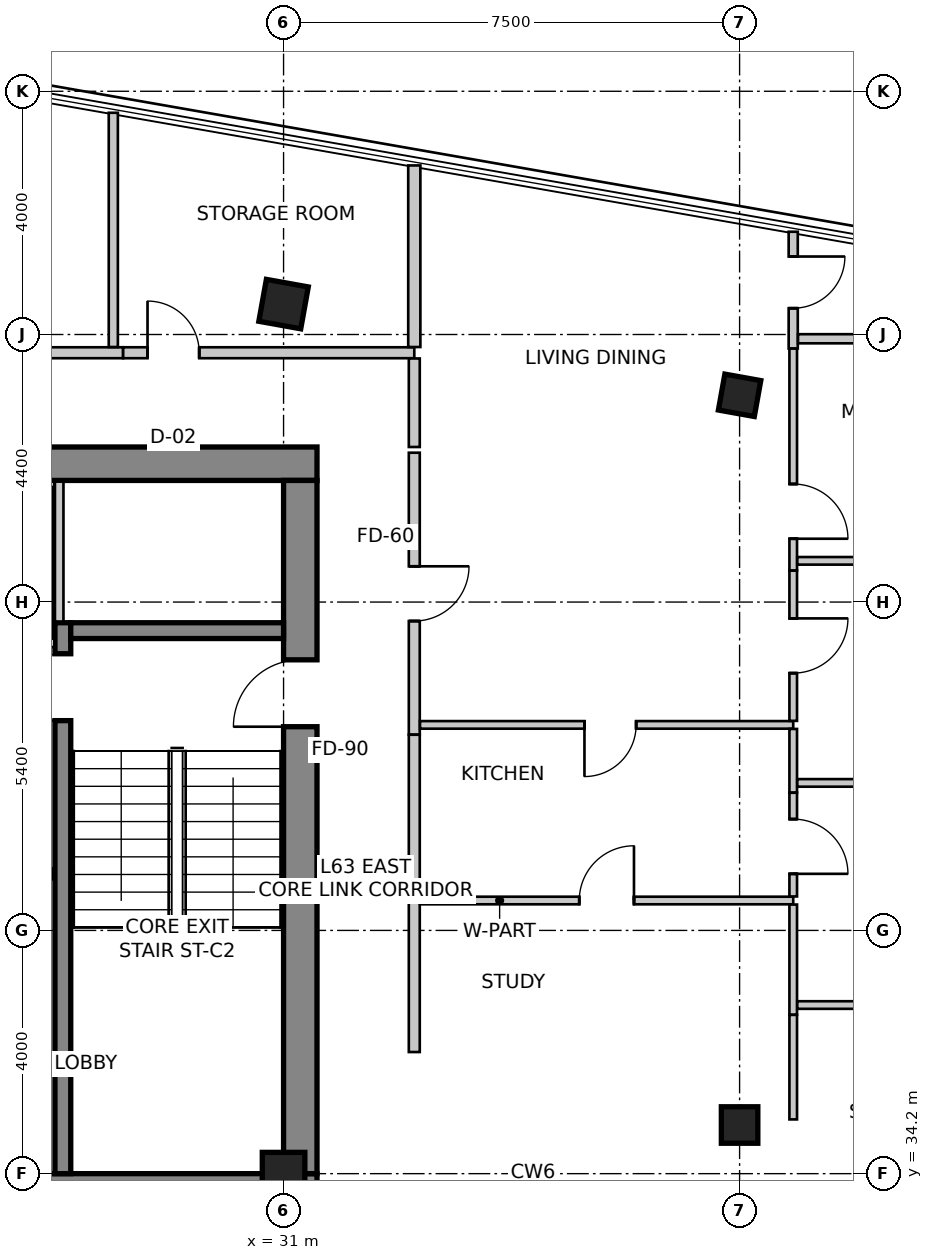
"""IFC4 building model, lengths in metres.
Left out: names, types, materials, properties, quantities, classifications, styles, units other than length and angle.
Written with IfcOpenShell. Run it as: python <this file> out.ifc"""

import sys

from ifc_helpers import new_model, si_unit, direction, frame, frame_2d, origin, origin_2d, place, context, subcontext, project, spatial, rectangle, extrude, source, transform, mapped, element, fill, save


model = new_model("IFC4")
c1 = context("Model", 3, precision=1e-05, world=origin(), true_north=direction((0.0, 1.0)))
c2 = subcontext(c1, "Body", "Model", "MODEL_VIEW")
j1 = project(units=[si_unit("LENGTHUNIT", "METRE"), si_unit("PLANEANGLEUNIT", "RADIAN")], contexts=[c1])
p1 = place(None, origin())
s1 = spatial("IfcSite", under=j1, at=p1, CompositionType="ELEMENT")
p2 = place(p1, origin())
s2 = spatial("IfcBuilding", under=s1, at=p2, CompositionType="ELEMENT")
p3 = place(p2, frame((0.0, 0.0, 249.3)))
s3 = spatial("IfcBuildingStorey", under=s2, at=p3, CompositionType="ELEMENT", Elevation=249.3)
p4 = place(p3, frame((16.05, 45.875, 0.0), z_axis=(0.0, 0.0, 1.0), x_axis=(1.0, 0.0, 0.0)))
e1 = element("IfcWall", 1, at=p4, inside=s3, PredefinedType="SHEAR", context=c2, shape_type="SweptSolid", body=[
    extrude(rectangle(XDim=15.5, YDim=0.55, at=frame_2d((7.75, 0.0))), origin(), (0.0, 0.0, 1.0), 3.6),
])
p5 = place(p3, frame((16.05, 33.925, 0.0), z_axis=(0.0, 0.0, 1.0), x_axis=(1.0, 0.0, 0.0)))
e2 = element("IfcWall", 2, at=p5, inside=s3, PredefinedType="SHEAR", context=c2, shape_type="SweptSolid", body=[
    extrude(rectangle(XDim=15.5, YDim=0.55, at=frame_2d((7.75, 0.0))), origin(), (0.0, 0.0, 1.0), 3.6),
])
m1 = source(origin(), c2, "Body", "SweptSolid", [
    extrude(rectangle(XDim=1.1, YDim=2.15, at=frame_2d((0.55, 1.075))), frame((0.0, 0.285, 0.0), z_axis=(0.0, -1.0, 0.0), x_axis=(1.0, 0.0, 0.0)), (0.0, 0.0, 1.0), 0.57),
])
p6 = place(p5, frame((9.98, 0.0, 0.0)))
e3 = element("IfcOpeningElement", 3, at=p6, cuts=e2, PredefinedType="OPENING", context=c2, shape_type="MappedRepresentation", body=[
    mapped(m1, transform((0.0, 0.0, 0.0), scale=1.0)),
])
p7 = place(p3, frame((31.275, 34.2, 0.0), z_axis=(0.0, 0.0, 1.0), x_axis=(0.0, 1.0, 0.0)))
e4 = element("IfcWall", 4, at=p7, inside=s3, PredefinedType="SHEAR", context=c2, shape_type="SweptSolid", body=[
    extrude(rectangle(XDim=11.4, YDim=0.55, at=frame_2d((5.7, 0.0))), origin(), (0.0, 0.0, 1.0), 3.6),
])
p8 = place(p7, frame((7.35, 0.0, 0.0)))
e5 = element("IfcOpeningElement", 5, at=p8, cuts=e4, PredefinedType="OPENING", context=c2, shape_type="MappedRepresentation", body=[
    mapped(m1, transform((0.0, 0.0, 0.0), scale=1.0)),
])
p9 = place(p3, frame((27.37, 34.2, 0.0), z_axis=(0.0, 0.0, 1.0), x_axis=(0.0, 1.0, 0.0)))
e6 = element("IfcWall", 6, at=p9, inside=s3, PredefinedType="SHEAR", context=c2, shape_type="SweptSolid", body=[
    extrude(rectangle(XDim=9.06, YDim=0.26, at=frame_2d((4.53, 0.0))), origin(), (0.0, 0.0, 1.0), 3.6),
])
m2 = source(origin(), c2, "Body", "SweptSolid", [
    extrude(rectangle(XDim=1.1, YDim=2.15, at=frame_2d((0.55, 1.075))), frame((0.0, 0.14, 0.0), z_axis=(0.0, -1.0, 0.0), x_axis=(1.0, 0.0, 0.0)), (0.0, 0.0, 1.0), 0.28),
])
p10 = place(p9, frame((7.45, 0.0, 0.0)))
e7 = element("IfcOpeningElement", 7, at=p10, cuts=e6, PredefinedType="OPENING", context=c2, shape_type="MappedRepresentation", body=[
    mapped(m2, transform((0.0, 0.0, 0.0), scale=1.0)),
])
p11 = place(p3, frame((27.5, 43.13, 0.0), z_axis=(0.0, 0.0, 1.0), x_axis=(1.0, 0.0, 0.0)))
e8 = element("IfcWall", 8, at=p11, inside=s3, PredefinedType="SHEAR", context=c2, shape_type="SweptSolid", body=[
    extrude(rectangle(XDim=3.5, YDim=0.26, at=frame_2d((1.75, 0.0))), origin(), (0.0, 0.0, 1.0), 3.6),
])
m3 = source(origin(), c2, "Body", "SweptSolid", [
    extrude(rectangle(XDim=0.7, YDim=0.7, at=origin_2d()), origin(), (0.0, 0.0, 1.0), 3.6),
])
p12 = place(p3, frame((31.0, 48.5, 0.0), z_axis=(0.0, 0.0, 1.0), x_axis=(0.984195607969, -0.17708474032, 0.0)))
e9 = element("IfcColumn", 9, at=p12, inside=s3, PredefinedType="COLUMN", context=c2, shape_type="MappedRepresentation", body=[
    mapped(m3, transform((0.0, 0.0, 0.0), scale=1.0)),
])
m4 = source(origin(), c2, "Body", "SweptSolid", [
    extrude(rectangle(XDim=0.6, YDim=0.6, at=origin_2d()), origin(), (0.0, 0.0, 1.0), 3.6),
])
p13 = place(p3, frame((38.5, 47.0, 0.0), z_axis=(0.0, 0.0, 1.0), x_axis=(0.984195607969, -0.17708474032, 0.0)))
e10 = element("IfcColumn", 10, at=p13, inside=s3, PredefinedType="COLUMN", context=c2, shape_type="MappedRepresentation", body=[
    mapped(m4, transform((0.0, 0.0, 0.0), scale=1.0)),
])
p14 = place(p3, frame((31.0, 34.2, 0.0), z_axis=(0.0, 0.0, 1.0), x_axis=(1.0, 0.0, 0.0)))
e11 = element("IfcColumn", 11, at=p14, inside=s3, PredefinedType="COLUMN", context=c2, shape_type="MappedRepresentation", body=[
    mapped(m3, transform((0.0, 0.0, 0.0), scale=1.0)),
])
p15 = place(p3, frame((38.5, 35.0, 0.0), z_axis=(0.0, 0.0, 1.0), x_axis=(1.0, 0.0, 0.0)))
e12 = element("IfcColumn", 12, at=p15, inside=s3, PredefinedType="COLUMN", context=c2, shape_type="MappedRepresentation", body=[
    mapped(m4, transform((0.0, 0.0, 0.0), scale=1.0)),
])
p16 = place(p3, frame((20.37, 42.93, 0.0), z_axis=(0.0, 0.0, 1.0), x_axis=(1.0, 0.0, 0.0)))
e13 = element("IfcWall", 13, at=p16, inside=s3, PredefinedType="SOLIDWALL", context=c2, shape_type="SweptSolid", body=[
    extrude(rectangle(XDim=6.86, YDim=0.14, at=frame_2d((3.43, 0.0))), origin(), (0.0, 0.0, 1.0), 3.35),
])
m5 = source(origin(), c2, "Body", "SweptSolid", [
    extrude(rectangle(XDim=1.1, YDim=2.15, at=frame_2d((0.55, 1.075))), frame((0.0, 0.08, 0.0), z_axis=(0.0, -1.0, 0.0), x_axis=(1.0, 0.0, 0.0)), (0.0, 0.0, 1.0), 0.16),
])
p17 = place(p16, frame((0.5, 0.0, 0.0)))
e14 = element("IfcOpeningElement", 14, at=p17, cuts=e13, PredefinedType="OPENING", context=c2, shape_type="MappedRepresentation", body=[
    mapped(m5, transform((0.0, 0.0, 0.0), scale=1.0)),
])
p18 = place(p16, frame((2.7, 0.0, 0.0)))
e15 = element("IfcOpeningElement", 15, at=p18, cuts=e13, PredefinedType="OPENING", context=c2, shape_type="MappedRepresentation", body=[
    mapped(m5, transform((0.0, 0.0, 0.0), scale=1.0)),
])
p19 = place(p16, frame((5.1, 0.0, 0.0)))
e16 = element("IfcOpeningElement", 16, at=p19, cuts=e13, PredefinedType="OPENING", context=c2, shape_type="MappedRepresentation", body=[
    mapped(m5, transform((0.0, 0.0, 0.0), scale=1.0)),
])
p20 = place(p3, frame((27.31, 43.28, 0.0), z_axis=(0.0, 0.0, 1.0), x_axis=(0.0, 1.0, 0.0)))
e17 = element("IfcWall", 17, at=p20, inside=s3, PredefinedType="SOLIDWALL", context=c2, shape_type="SweptSolid", body=[
    extrude(rectangle(XDim=2.3, YDim=0.14, at=frame_2d((1.15, 0.0))), origin(), (0.0, 0.0, 1.0), 3.35),
])
p21 = place(p3, frame((24.162, 47.7, 0.0), z_axis=(0.0, 0.0, 1.0), x_axis=(1.0, 0.0, 0.0)))
e18 = element("IfcWall", 18, at=p21, inside=s3, PredefinedType="PARTITIONING", context=c2, shape_type="SweptSolid", body=[
    extrude(rectangle(XDim=4.198, YDim=0.18, at=frame_2d((2.099, 0.0))), origin(), (0.0, 0.0, 1.0), 3.35),
])
m6 = source(origin(), c2, "Body", "SweptSolid", [
    extrude(rectangle(XDim=0.85, YDim=2.15, at=frame_2d((0.425, 1.075))), frame((0.0, 0.1, 0.0), z_axis=(0.0, -1.0, 0.0), x_axis=(1.0, 0.0, 0.0)), (0.0, 0.0, 1.0), 0.2),
])
p22 = place(p21, frame((1.613, 0.0, 0.0)))
e19 = element("IfcOpeningElement", 19, at=p22, cuts=e18, PredefinedType="OPENING", context=c2, shape_type="MappedRepresentation", body=[
    mapped(m6, transform((0.0, 0.0, 0.0), scale=1.0)),
])
p23 = place(p3, frame((28.362, 47.7, 0.0), z_axis=(0.0, 0.0, 1.0), x_axis=(1.0, 0.0, 0.0)))
e20 = element("IfcWall", 20, at=p23, inside=s3, PredefinedType="PARTITIONING", context=c2, shape_type="SweptSolid", body=[
    extrude(rectangle(XDim=4.788, YDim=0.18, at=frame_2d((2.394, 0.0))), origin(), (0.0, 0.0, 1.0), 2.788),
])
p24 = place(p23, frame((0.401, 0.0, 0.0)))
e21 = element("IfcOpeningElement", 21, at=p24, cuts=e20, PredefinedType="OPENING", context=c2, shape_type="MappedRepresentation", body=[
    mapped(m6, transform((0.0, 0.0, 0.0), scale=1.0)),
])
p25 = place(p3, frame((33.15, 47.606, 0.0), z_axis=(0.0, 0.0, 1.0), x_axis=(0.0, -1.0, 0.0)))
e22 = element("IfcWall", 22, at=p25, inside=s3, PredefinedType="PARTITIONING", context=c2, shape_type="SweptSolid", body=[
    extrude(rectangle(XDim=1.456, YDim=0.18, at=frame_2d((0.728, 0.0))), origin(), (0.0, 0.0, 1.0), 3.35),
])
p26 = place(p3, frame((33.15, 38.852, 0.0), z_axis=(0.0, 0.0, 1.0), x_axis=(0.0, -1.0, 0.0)))
e23 = element("IfcWall", 23, at=p26, inside=s3, PredefinedType="PARTITIONING", context=c2, shape_type="SweptSolid", body=[
    extrude(rectangle(XDim=2.652, YDim=0.18, at=frame_2d((1.326, 0.0))), origin(), (0.0, 0.0, 1.0), 3.35),
])
p27 = place(p3, frame((33.15, 46.056, 0.0), z_axis=(0.0, 0.0, 1.0), x_axis=(0.0, -1.0, 0.0)))
e24 = element("IfcWall", 24, at=p27, inside=s3, PredefinedType="PARTITIONING", context=c2, shape_type="SweptSolid", body=[
    extrude(rectangle(XDim=4.636, YDim=0.18, at=frame_2d((2.318, 0.0))), origin(), (0.0, 0.0, 1.0), 2.788),
])
m7 = source(origin(), c2, "Body", "SweptSolid", [
    extrude(rectangle(XDim=0.9, YDim=2.15, at=frame_2d((0.45, 1.075))), frame((0.0, 0.1, 0.0), z_axis=(0.0, -1.0, 0.0), x_axis=(1.0, 0.0, 0.0)), (0.0, 0.0, 1.0), 0.2),
])
p28 = place(p27, frame((1.868, 0.0, 0.0)))
e25 = element("IfcOpeningElement", 25, at=p28, cuts=e24, PredefinedType="OPENING", context=c2, shape_type="MappedRepresentation", body=[
    mapped(m7, transform((0.0, 0.0, 0.0), scale=1.0)),
])
p29 = place(p3, frame((33.15, 41.418, 0.0), z_axis=(0.0, 0.0, 1.0), x_axis=(0.0, -1.0, 0.0)))
e26 = element("IfcWall", 26, at=p29, inside=s3, PredefinedType="PARTITIONING", context=c2, shape_type="SweptSolid", body=[
    extrude(rectangle(XDim=2.564, YDim=0.18, at=frame_2d((1.282, 0.0))), origin(), (0.0, 0.0, 1.0), 3.35),
])
p30 = place(p3, frame((28.2, 51.646, 0.0), z_axis=(0.0, 0.0, 1.0), x_axis=(0.0, -1.0, 0.0)))
e27 = element("IfcWall", 27, at=p30, inside=s3, PredefinedType="PARTITIONING", context=c2, shape_type="SweptSolid", body=[
    extrude(rectangle(XDim=3.852, YDim=0.15, at=frame_2d((1.926, 0.0))), origin(), (0.0, 0.0, 1.0), 2.642),
])
p31 = place(p3, frame((33.15, 50.78, 0.0), z_axis=(0.0, 0.0, 1.0), x_axis=(0.0, -1.0, 0.0)))
e28 = element("IfcWall", 28, at=p31, inside=s3, PredefinedType="PARTITIONING", context=c2, shape_type="SweptSolid", body=[
    extrude(rectangle(XDim=2.986, YDim=0.2, at=frame_2d((1.493, 0.0))), origin(), (0.0, 0.0, 1.0), 2.642),
])
p32 = place(p3, frame((33.244, 38.692, 0.0), z_axis=(0.0, 0.0, 1.0), x_axis=(1.0, 0.0, 0.0)))
e29 = element("IfcWall", 29, at=p32, inside=s3, PredefinedType="PARTITIONING", context=c2, shape_type="SweptSolid", body=[
    extrude(rectangle(XDim=6.138, YDim=0.125, at=frame_2d((3.069, 0.0))), origin(), (0.0, 0.0, 1.0), 2.935),
])
m8 = source(origin(), c2, "Body", "SweptSolid", [
    extrude(rectangle(XDim=0.9, YDim=2.15, at=frame_2d((0.45, 1.075))), frame((0.0, 0.073, 0.0), z_axis=(0.0, -1.0, 0.0), x_axis=(1.0, 0.0, 0.0)), (0.0, 0.0, 1.0), 0.145),
])
p33 = place(p32, frame((2.619, 0.0, 0.0)))
e30 = element("IfcOpeningElement", 30, at=p33, cuts=e29, PredefinedType="OPENING", context=c2, shape_type="MappedRepresentation", body=[
    mapped(m8, transform((0.0, 0.0, 0.0), scale=1.0)),
])
p34 = place(p3, frame((39.382, 38.625, 0.0), z_axis=(0.0, 0.0, 1.0), x_axis=(0.0, -1.0, 0.0)))
e31 = element("IfcWall", 31, at=p34, inside=s3, PredefinedType="PARTITIONING", context=c2, shape_type="SweptSolid", body=[
    extrude(rectangle(XDim=1.812, YDim=0.125, at=frame_2d((0.906, 0.0))), origin(), (0.0, 0.0, 1.0), 3.35),
])
p35 = place(p3, frame((39.382, 36.811, 0.0), z_axis=(0.0, 0.0, 1.0), x_axis=(0.0, -1.0, 0.0)))
e32 = element("IfcWall", 32, at=p35, inside=s3, PredefinedType="PARTITIONING", context=c2, shape_type="SweptSolid", body=[
    extrude(rectangle(XDim=1.719, YDim=0.125, at=frame_2d((0.859, 0.0))), origin(), (0.0, 0.0, 1.0), 3.35),
])
p36 = place(p3, frame((39.382, 41.58, 0.0), z_axis=(0.0, 0.0, 1.0), x_axis=(-1.0, 0.0, 0.0)))
e33 = element("IfcWall", 33, at=p36, inside=s3, PredefinedType="PARTITIONING", context=c2, shape_type="SweptSolid", body=[
    extrude(rectangle(XDim=6.138, YDim=0.125, at=frame_2d((3.069, 0.0))), origin(), (0.0, 0.0, 1.0), 2.935),
])
m9 = source(origin(), c2, "Body", "SweptSolid", [
    extrude(rectangle(XDim=0.85, YDim=2.15, at=frame_2d((0.425, 1.075))), frame((0.0, 0.073, 0.0), z_axis=(0.0, -1.0, 0.0), x_axis=(1.0, 0.0, 0.0)), (0.0, 0.0, 1.0), 0.145),
])
p37 = place(p36, frame((2.583, 0.0, 0.0)))
e34 = element("IfcOpeningElement", 34, at=p37, cuts=e33, PredefinedType="OPENING", context=c2, shape_type="MappedRepresentation", body=[
    mapped(m9, transform((0.0, 0.0, 0.0), scale=1.0)),
])
p38 = place(p3, frame((39.382, 49.69, 0.0), z_axis=(0.0, 0.0, 1.0), x_axis=(0.0, -1.0, 0.0)))
e35 = element("IfcWall", 35, at=p38, inside=s3, PredefinedType="PARTITIONING", context=c2, shape_type="SweptSolid", body=[
    extrude(rectangle(XDim=1.92, YDim=0.15, at=frame_2d((0.96, 0.0))), origin(), (0.0, 0.0, 1.0), 3.35),
])
m10 = source(origin(), c2, "Body", "SweptSolid", [
    extrude(rectangle(XDim=0.85, YDim=2.15, at=frame_2d((0.425, 1.075))), frame((0.0, 0.085, 0.0), z_axis=(0.0, -1.0, 0.0), x_axis=(1.0, 0.0, 0.0)), (0.0, 0.0, 1.0), 0.17),
])
p39 = place(p38, frame((0.407, 0.0, 0.0)))
e36 = element("IfcOpeningElement", 36, at=p39, cuts=e35, PredefinedType="OPENING", context=c2, shape_type="MappedRepresentation", body=[
    mapped(m10, transform((0.0, 0.0, 0.0), scale=1.0)),
])
p40 = place(p3, frame((39.382, 47.768, 0.0), z_axis=(0.0, 0.0, 1.0), x_axis=(0.0, -1.0, 0.0)))
e37 = element("IfcWall", 37, at=p40, inside=s3, PredefinedType="PARTITIONING", context=c2, shape_type="SweptSolid", body=[
    extrude(rectangle(XDim=3.65, YDim=0.125, at=frame_2d((1.825, 0.0))), origin(), (0.0, 0.0, 1.0), 3.35),
])
p41 = place(p40, frame((2.227, 0.0, 0.0)))
e38 = element("IfcOpeningElement", 38, at=p41, cuts=e37, PredefinedType="OPENING", context=c2, shape_type="MappedRepresentation", body=[
    mapped(m8, transform((0.0, 0.0, 0.0), scale=1.0)),
])
p42 = place(p3, frame((39.382, 44.116, 0.0), z_axis=(0.0, 0.0, 1.0), x_axis=(0.0, -1.0, 0.0)))
e39 = element("IfcWall", 39, at=p42, inside=s3, PredefinedType="PARTITIONING", context=c2, shape_type="SweptSolid", body=[
    extrude(rectangle(XDim=2.469, YDim=0.125, at=frame_2d((1.235, 0.0))), origin(), (0.0, 0.0, 1.0), 3.35),
])
p43 = place(p42, frame((0.785, 0.0, 0.0)))
e40 = element("IfcOpeningElement", 40, at=p43, cuts=e39, PredefinedType="OPENING", context=c2, shape_type="MappedRepresentation", body=[
    mapped(m8, transform((0.0, 0.0, 0.0), scale=1.0)),
])
p44 = place(p3, frame((39.382, 41.513, 0.0), z_axis=(0.0, 0.0, 1.0), x_axis=(0.0, -1.0, 0.0)))
e41 = element("IfcWall", 41, at=p44, inside=s3, PredefinedType="PARTITIONING", context=c2, shape_type="SweptSolid", body=[
    extrude(rectangle(XDim=1.047, YDim=0.125, at=frame_2d((0.524, 0.0))), origin(), (0.0, 0.0, 1.0), 3.35),
])
p45 = place(p3, frame((39.382, 40.464, 0.0), z_axis=(0.0, 0.0, 1.0), x_axis=(0.0, -1.0, 0.0)))
e42 = element("IfcWall", 42, at=p45, inside=s3, PredefinedType="PARTITIONING", context=c2, shape_type="SweptSolid", body=[
    extrude(rectangle(XDim=1.706, YDim=0.125, at=frame_2d((0.853, 0.0))), origin(), (0.0, 0.0, 1.0), 3.35),
])
p46 = place(p45, frame((0.433, 0.0, 0.0)))
e43 = element("IfcOpeningElement", 43, at=p46, cuts=e42, PredefinedType="OPENING", context=c2, shape_type="MappedRepresentation", body=[
    mapped(m8, transform((0.0, 0.0, 0.0), scale=1.0)),
])
p47 = place(p3, frame((44.351, 47.93, 0.0), z_axis=(0.0, 0.0, 1.0), x_axis=(-1.0, 0.0, 0.0)))
e44 = element("IfcWall", 44, at=p47, inside=s3, PredefinedType="PARTITIONING", context=c2, shape_type="SweptSolid", body=[
    extrude(rectangle(XDim=4.89, YDim=0.15, at=frame_2d((2.445, 0.0))), origin(), (0.0, 0.0, 1.0), 3.35),
])
for number, where, z_axis, x_axis in (
    (45, (45.135, 44.278, 0.0), (0.0, 0.0, 1.0), (-1.0, 0.0, 0.0)),
    (46, (45.135, 40.626, 0.0), (0.0, 0.0, 1.0), (-1.0, 0.0, 0.0)),
):
    element("IfcWall", number, at=place(p3, frame(where, z_axis=z_axis, x_axis=x_axis)), inside=s3, PredefinedType="PARTITIONING", context=c2, shape_type="SweptSolid", body=[
        extrude(rectangle(XDim=5.687, YDim=0.125, at=frame_2d((2.843, 0.0))), origin(), (0.0, 0.0, 1.0), 3.35),
    ])
p48 = place(p3, frame((45.135, 36.973, 0.0), z_axis=(0.0, 0.0, 1.0), x_axis=(-1.0, 0.0, 0.0)))
e47 = element("IfcWall", 47, at=p48, inside=s3, PredefinedType="PARTITIONING", context=c2, shape_type="SweptSolid", body=[
    extrude(rectangle(XDim=5.687, YDim=0.125, at=frame_2d((2.843, 0.0))), origin(), (0.0, 0.0, 1.0), 3.35),
])
p49 = place(p48, frame((2.333, 0.0, 0.0)))
e48 = element("IfcOpeningElement", 48, at=p49, cuts=e47, PredefinedType="OPENING", context=c2, shape_type="MappedRepresentation", body=[
    mapped(m8, transform((0.0, 0.0, 0.0), scale=1.0)),
])
m11 = source(origin(), c2, "Body", "SweptSolid", [
    extrude(rectangle(XDim=1.1, YDim=2.15, at=frame_2d((0.55, 1.075))), frame((0.0, 0.025, 0.0), z_axis=(0.0, -1.0, 0.0), x_axis=(1.0, 0.0, 0.0)), (0.0, 0.0, 1.0), 0.05),
])
p50 = place(p10, origin())
e49 = element("IfcDoor", 49, at=p50, inside=s3, OperationType="SINGLE_SWING_LEFT", PredefinedType="DOOR", context=c2, shape_type="MappedRepresentation", body=[
    mapped(m11, transform((0.0, 0.0, 0.0), scale=1.0)),
])
fill(e7, e49)
p51 = place(p8, origin())
e50 = element("IfcDoor", 50, at=p51, inside=s3, OperationType="SINGLE_SWING_LEFT", PredefinedType="DOOR", context=c2, shape_type="MappedRepresentation", body=[
    mapped(m11, transform((0.0, 0.0, 0.0), scale=1.0)),
])
fill(e5, e50)
m12 = source(origin(), c2, "Body", "SweptSolid", [
    extrude(rectangle(XDim=0.85, YDim=2.15, at=frame_2d((0.425, 1.075))), frame((0.0, 0.025, 0.0), z_axis=(0.0, -1.0, 0.0), x_axis=(1.0, 0.0, 0.0)), (0.0, 0.0, 1.0), 0.05),
])
p52 = place(p24, origin())
e51 = element("IfcDoor", 51, at=p52, inside=s3, OperationType="SINGLE_SWING_LEFT", PredefinedType="DOOR", context=c2, shape_type="MappedRepresentation", body=[
    mapped(m12, transform((0.0, 0.0, 0.0), scale=1.0)),
])
fill(e21, e51)
m13 = source(origin(), c2, "Body", "SweptSolid", [
    extrude(rectangle(XDim=0.9, YDim=2.15, at=frame_2d((0.45, 1.075))), frame((0.0, 0.025, 0.0), z_axis=(0.0, -1.0, 0.0), x_axis=(1.0, 0.0, 0.0)), (0.0, 0.0, 1.0), 0.05),
])
p53 = place(p33, origin())
e52 = element("IfcDoor", 52, at=p53, inside=s3, OperationType="SINGLE_SWING_RIGHT", PredefinedType="DOOR", context=c2, shape_type="MappedRepresentation", body=[
    mapped(m13, transform((0.0, 0.0, 0.0), scale=1.0)),
])
fill(e30, e52)
m14 = source(origin(), c2, "Body", "SweptSolid", [
    extrude(rectangle(XDim=0.9, YDim=2.15, at=frame_2d((0.45, 1.075))), frame((0.0, 0.025, 0.0), z_axis=(0.0, -1.0, 0.0), x_axis=(1.0, 0.0, 0.0)), (0.0, 0.0, 1.0), 0.05),
])
p54 = place(p28, origin())
e53 = element("IfcDoor", 53, at=p54, inside=s3, OperationType="SINGLE_SWING_LEFT", PredefinedType="DOOR", context=c2, shape_type="MappedRepresentation", body=[
    mapped(m14, transform((0.0, 0.0, 0.0), scale=1.0)),
])
fill(e25, e53)
p55 = place(p37, origin())
e54 = element("IfcDoor", 54, at=p55, inside=s3, OperationType="SINGLE_SWING_RIGHT", PredefinedType="DOOR", context=c2, shape_type="MappedRepresentation", body=[
    mapped(m12, transform((0.0, 0.0, 0.0), scale=1.0)),
])
fill(e34, e54)
p56 = place(p39, origin())
e55 = element("IfcDoor", 55, at=p56, inside=s3, OperationType="SINGLE_SWING_LEFT", PredefinedType="DOOR", context=c2, shape_type="MappedRepresentation", body=[
    mapped(m12, transform((0.0, 0.0, 0.0), scale=1.0)),
])
fill(e36, e55)
p57 = place(p41, origin())
e56 = element("IfcDoor", 56, at=p57, inside=s3, OperationType="SINGLE_SWING_RIGHT", PredefinedType="DOOR", context=c2, shape_type="MappedRepresentation", body=[
    mapped(m13, transform((0.0, 0.0, 0.0), scale=1.0)),
])
fill(e38, e56)
p58 = place(p43, origin())
e57 = element("IfcDoor", 57, at=p58, inside=s3, OperationType="SINGLE_SWING_LEFT", PredefinedType="DOOR", context=c2, shape_type="MappedRepresentation", body=[
    mapped(m13, transform((0.0, 0.0, 0.0), scale=1.0)),
])
fill(e40, e57)
p59 = place(p46, origin())
e58 = element("IfcDoor", 58, at=p59, inside=s3, OperationType="SINGLE_SWING_RIGHT", PredefinedType="DOOR", context=c2, shape_type="MappedRepresentation", body=[
    mapped(m13, transform((0.0, 0.0, 0.0), scale=1.0)),
])
fill(e43, e58)
save(model, sys.argv[1])
